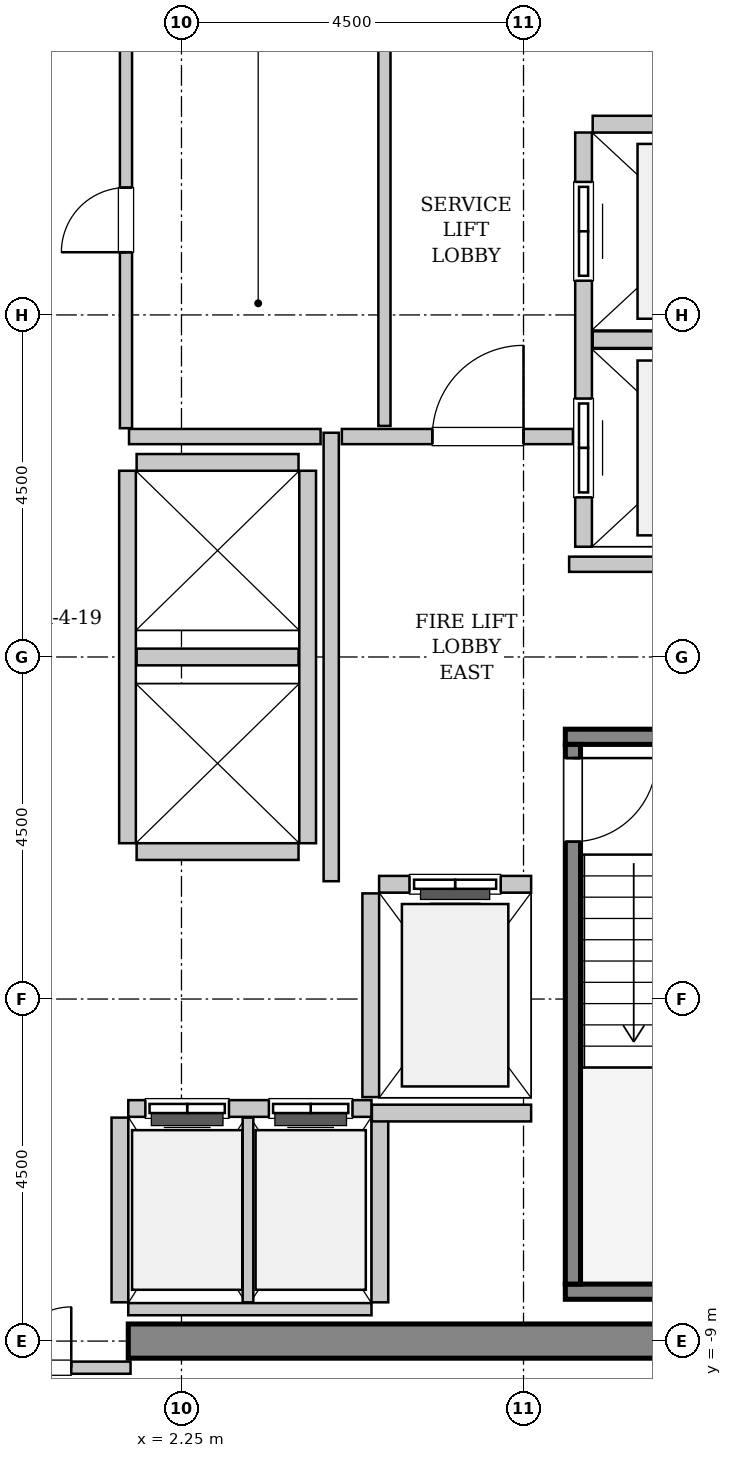
"""IFC4 building model, lengths in metres.
Left out: names, types, materials, properties, quantities, classifications, styles, units other than length and angle.
Written with IfcOpenShell. Run it as: python <this file> out.ifc"""

import sys

from ifc_helpers import new_model, si_unit, direction, frame, frame_2d, origin, place, context, subcontext, project, spatial, rectangle, extrude, source, transform, mapped, element, fill, save


model = new_model("IFC4")
c1 = context("Model", 3, precision=1e-05, world=origin(), true_north=direction((0.0, 1.0)))
c2 = subcontext(c1, "Body", "Model", "MODEL_VIEW")
j1 = project(units=[si_unit("LENGTHUNIT", "METRE"), si_unit("PLANEANGLEUNIT", "RADIAN")], contexts=[c1])
p1 = place(None, origin())
s1 = spatial("IfcSite", under=j1, at=p1, CompositionType="ELEMENT")
p2 = place(p1, origin())
s2 = spatial("IfcBuilding", under=s1, at=p2, CompositionType="ELEMENT")
p3 = place(p2, frame((0.0, 0.0, 225.6)))
s3 = spatial("IfcBuildingStorey", under=s2, at=p3, CompositionType="ELEMENT", Elevation=225.6)
m1 = source(origin(), c2, "Body", "SweptSolid", [
    extrude(rectangle(XDim=9.925, YDim=0.45, at=frame_2d((4.962, 0.0))), origin(), (0.0, 0.0, 1.0), 3.8),
])
p4 = place(p3, frame((1.55, -9.0, 0.0), z_axis=(0.0, 0.0, 1.0), x_axis=(1.0, 0.0, 0.0)))
e1 = element("IfcWall", 1, at=p4, inside=s3, PredefinedType="SHEAR", context=c2, shape_type="MappedRepresentation", body=[
    mapped(m1, transform((0.0, 0.0, 0.0), x_axis=(1.0, 0.0, 0.0), y_axis=(0.0, 1.0, 0.0), z_axis=(0.0, 0.0, 1.0), scale=1.0)),
])
m2 = source(origin(), c2, "Body", "SweptSolid", [
    extrude(rectangle(XDim=3.4, YDim=0.2, at=frame_2d((1.7, 0.0))), origin(), (0.0, 0.0, 1.0), 3.8),
])
p5 = place(p3, frame((7.3, -1.05, 0.0), z_axis=(0.0, 0.0, 1.0), x_axis=(1.0, 0.0, 0.0)))
e2 = element("IfcWall", 2, at=p5, inside=s3, PredefinedType="SOLIDWALL", context=c2, shape_type="MappedRepresentation", body=[
    mapped(m2, transform((0.0, 0.0, 0.0), x_axis=(1.0, 0.0, 0.0), y_axis=(0.0, 1.0, 0.0), z_axis=(0.0, 0.0, 1.0), scale=1.0)),
])
m3 = source(origin(), c2, "Body", "SweptSolid", [
    extrude(rectangle(XDim=3.73, YDim=0.2, at=frame_2d((1.865, 0.0))), origin(), (0.0, 0.0, 1.0), 3.8),
])
p6 = place(p3, frame((7.3, -8.35, 0.0), z_axis=(0.0, 0.0, 1.0), x_axis=(1.0, 0.0, 0.0)))
e3 = element("IfcWall", 3, at=p6, inside=s3, PredefinedType="SOLIDWALL", context=c2, shape_type="MappedRepresentation", body=[
    mapped(m3, transform((0.0, 0.0, 0.0), x_axis=(1.0, 0.0, 0.0), y_axis=(0.0, 1.0, 0.0), z_axis=(0.0, 0.0, 1.0), scale=1.0)),
])
m4 = source(origin(), c2, "Body", "SweptSolid", [
    extrude(rectangle(XDim=7.1, YDim=0.2, at=frame_2d((3.55, 0.0))), origin(), (0.0, 0.0, 1.0), 3.8),
])
p7 = place(p3, frame((7.4, -1.15, 0.0), z_axis=(0.0, 0.0, 1.0), x_axis=(0.0, -1.0, 0.0)))
e4 = element("IfcWall", 4, at=p7, inside=s3, PredefinedType="SOLIDWALL", context=c2, shape_type="MappedRepresentation", body=[
    mapped(m4, transform((0.0, 0.0, 0.0), x_axis=(1.0, 0.0, 0.0), y_axis=(0.0, 1.0, 0.0), z_axis=(0.0, 0.0, 1.0), scale=1.0)),
])
p8 = place(p7, frame((0.18, 0.0, 0.0)))
e5 = element("IfcOpeningElement", 5, at=p8, cuts=e4, PredefinedType="OPENING", context=c2, shape_type="SweptSolid", body=[
    extrude(rectangle(XDim=1.1, YDim=2.15, at=frame_2d((0.55, 1.075))), frame((0.0, 0.11, 0.0), z_axis=(0.0, -1.0, 0.0), x_axis=(1.0, 0.0, 0.0)), (0.0, 0.0, 1.0), 0.22),
])
m5 = source(origin(), c2, "Body", "SweptSolid", [
    extrude(rectangle(XDim=2.0, YDim=0.22, at=frame_2d((1.0, 0.0))), origin(), (0.0, 0.0, 1.0), 3.535),
])
p9 = place(p3, frame((6.85, -2.99, 0.0), z_axis=(0.0, 0.0, 1.0), x_axis=(-1.0, 0.0, 0.0)))
e6 = element("IfcWall", 6, at=p9, inside=s3, PredefinedType="SOLIDWALL", context=c2, shape_type="MappedRepresentation", body=[
    mapped(m5, transform((0.0, 0.0, 0.0), x_axis=(1.0, 0.0, 0.0), y_axis=(0.0, 1.0, 0.0), z_axis=(0.0, 0.0, 1.0), scale=1.0)),
])
p10 = place(p9, frame((0.4, 0.0, 0.0)))
e7 = element("IfcOpeningElement", 7, at=p10, cuts=e6, PredefinedType="OPENING", context=c2, shape_type="SweptSolid", body=[
    extrude(rectangle(XDim=1.2, YDim=2.2, at=frame_2d((0.6, 1.1))), frame((0.0, 0.12, 0.0), z_axis=(0.0, -1.0, 0.0), x_axis=(1.0, 0.0, 0.0)), (0.0, 0.0, 1.0), 0.24),
])
m6 = source(origin(), c2, "Body", "SweptSolid", [
    extrude(rectangle(XDim=2.68, YDim=0.22, at=frame_2d((1.34, 0.0))), origin(), (0.0, 0.0, 1.0), 3.535),
])
p11 = place(p3, frame((4.74, -3.11, 0.0), z_axis=(0.0, 0.0, 1.0), x_axis=(0.0, -1.0, 0.0)))
e8 = element("IfcWall", 8, at=p11, inside=s3, PredefinedType="SOLIDWALL", context=c2, shape_type="MappedRepresentation", body=[
    mapped(m6, transform((0.0, 0.0, 0.0), x_axis=(1.0, 0.0, 0.0), y_axis=(0.0, 1.0, 0.0), z_axis=(0.0, 0.0, 1.0), scale=1.0)),
])
m7 = source(origin(), c2, "Body", "SweptSolid", [
    extrude(rectangle(XDim=5.45, YDim=0.22, at=frame_2d((2.725, 0.0))), origin(), (0.0, 0.0, 1.0), 3.535),
])
p12 = place(p3, frame((7.54, 6.9, 0.0), z_axis=(0.0, 0.0, 1.0), x_axis=(0.0, -1.0, 0.0)))
e9 = element("IfcWall", 9, at=p12, inside=s3, PredefinedType="SOLIDWALL", context=c2, shape_type="MappedRepresentation", body=[
    mapped(m7, transform((0.0, 0.0, 0.0), x_axis=(1.0, 0.0, 0.0), y_axis=(0.0, 1.0, 0.0), z_axis=(0.0, 0.0, 1.0), scale=1.0)),
])
p13 = place(p12, frame((3.5, 0.0, 0.0)))
e10 = element("IfcOpeningElement", 10, at=p13, cuts=e9, PredefinedType="OPENING", context=c2, shape_type="SweptSolid", body=[
    extrude(rectangle(XDim=1.3, YDim=2.3, at=frame_2d((0.65, 1.15))), frame((0.0, 0.12, 0.0), z_axis=(0.0, -1.0, 0.0), x_axis=(1.0, 0.0, 0.0)), (0.0, 0.0, 1.0), 0.24),
])
p14 = place(p12, frame((0.65, 0.0, 0.0)))
e11 = element("IfcOpeningElement", 11, at=p14, cuts=e9, PredefinedType="OPENING", context=c2, shape_type="SweptSolid", body=[
    extrude(rectangle(XDim=1.3, YDim=2.3, at=frame_2d((0.65, 1.15))), frame((0.0, 0.12, 0.0), z_axis=(0.0, -1.0, 0.0), x_axis=(1.0, 0.0, 0.0)), (0.0, 0.0, 1.0), 0.24),
])
m8 = source(origin(), c2, "Body", "SweptSolid", [
    extrude(rectangle(XDim=2.78, YDim=0.22, at=frame_2d((1.39, 0.0))), origin(), (0.0, 0.0, 1.0), 3.535),
])
for number, where, z_axis, x_axis in (
    (12, (7.66, 4.175, 0.0), (0.0, 0.0, 1.0), (1.0, 0.0, 0.0)),
    (13, (10.44, 7.01, 0.0), (0.0, 0.0, 1.0), (-1.0, 0.0, 0.0)),
):
    element("IfcWall", number, at=place(p3, frame(where, z_axis=z_axis, x_axis=x_axis)), inside=s3, PredefinedType="SOLIDWALL", context=c2, shape_type="MappedRepresentation", body=[
        mapped(m8, transform((0.0, 0.0, 0.0), x_axis=(1.0, 0.0, 0.0), y_axis=(0.0, 1.0, 0.0), z_axis=(0.0, 0.0, 1.0), scale=1.0)),
    ])
m9 = source(origin(), c2, "Body", "SweptSolid", [
    extrude(rectangle(XDim=3.2, YDim=0.22, at=frame_2d((1.6, 0.0))), origin(), (0.0, 0.0, 1.0), 3.535),
])
p15 = place(p3, frame((4.75, -5.94, 0.0), z_axis=(0.0, 0.0, 1.0), x_axis=(-1.0, 0.0, 0.0)))
e14 = element("IfcWall", 14, at=p15, inside=s3, PredefinedType="SOLIDWALL", context=c2, shape_type="MappedRepresentation", body=[
    mapped(m9, transform((0.0, 0.0, 0.0), x_axis=(1.0, 0.0, 0.0), y_axis=(0.0, 1.0, 0.0), z_axis=(0.0, 0.0, 1.0), scale=1.0)),
])
p16 = place(p15, frame((1.875, 0.0, 0.0)))
e15 = element("IfcOpeningElement", 15, at=p16, cuts=e14, PredefinedType="OPENING", context=c2, shape_type="SweptSolid", body=[
    extrude(rectangle(XDim=1.1, YDim=2.2, at=frame_2d((0.55, 1.1))), frame((0.0, 0.12, 0.0), z_axis=(0.0, -1.0, 0.0), x_axis=(1.0, 0.0, 0.0)), (0.0, 0.0, 1.0), 0.24),
])
p17 = place(p15, frame((0.25, 0.0, 0.0)))
e16 = element("IfcOpeningElement", 16, at=p17, cuts=e14, PredefinedType="OPENING", context=c2, shape_type="SweptSolid", body=[
    extrude(rectangle(XDim=1.1, YDim=2.2, at=frame_2d((0.55, 1.1))), frame((0.0, 0.12, 0.0), z_axis=(0.0, -1.0, 0.0), x_axis=(1.0, 0.0, 0.0)), (0.0, 0.0, 1.0), 0.24),
])
m10 = source(origin(), c2, "Body", "SweptSolid", [
    extrude(rectangle(XDim=3.2, YDim=0.16, at=frame_2d((1.6, 0.0))), origin(), (0.0, 0.0, 1.0), 2.625),
])
p18 = place(p3, frame((1.55, -8.58, 0.0), z_axis=(0.0, 0.0, 1.0), x_axis=(1.0, 0.0, 0.0)))
e17 = element("IfcWall", 17, at=p18, inside=s3, PredefinedType="PARTITIONING", context=c2, shape_type="MappedRepresentation", body=[
    mapped(m10, transform((0.0, 0.0, 0.0), x_axis=(1.0, 0.0, 0.0), y_axis=(0.0, 1.0, 0.0), z_axis=(0.0, 0.0, 1.0), scale=1.0)),
])
m11 = source(origin(), c2, "Body", "SweptSolid", [
    extrude(rectangle(XDim=2.43, YDim=0.22, at=frame_2d((1.215, 0.0))), origin(), (0.0, 0.0, 1.0), 3.535),
])
p19 = place(p3, frame((1.44, -6.06, 0.0), z_axis=(0.0, 0.0, 1.0), x_axis=(0.0, -1.0, 0.0)))
e18 = element("IfcWall", 18, at=p19, inside=s3, PredefinedType="SOLIDWALL", context=c2, shape_type="MappedRepresentation", body=[
    mapped(m11, transform((0.0, 0.0, 0.0), x_axis=(1.0, 0.0, 0.0), y_axis=(0.0, 1.0, 0.0), z_axis=(0.0, 0.0, 1.0), scale=1.0)),
])
m12 = source(origin(), c2, "Body", "SweptSolid", [
    extrude(rectangle(XDim=2.43, YDim=0.14, at=frame_2d((1.215, 0.0))), origin(), (0.0, 0.0, 1.0), 3.535),
])
p20 = place(p3, frame((3.125, -8.49, 0.0), z_axis=(0.0, 0.0, 1.0), x_axis=(0.0, 1.0, 0.0)))
e19 = element("IfcWall", 19, at=p20, inside=s3, PredefinedType="PARTITIONING", context=c2, shape_type="MappedRepresentation", body=[
    mapped(m12, transform((0.0, 0.0, 0.0), x_axis=(1.0, 0.0, 0.0), y_axis=(0.0, 1.0, 0.0), z_axis=(0.0, 0.0, 1.0), scale=1.0)),
])
p21 = place(p3, frame((4.86, -8.49, 0.0), z_axis=(0.0, 0.0, 1.0), x_axis=(0.0, 1.0, 0.0)))
e20 = element("IfcWall", 20, at=p21, inside=s3, PredefinedType="SOLIDWALL", context=c2, shape_type="MappedRepresentation", body=[
    mapped(m11, transform((0.0, 0.0, 0.0), x_axis=(1.0, 0.0, 0.0), y_axis=(0.0, 1.0, 0.0), z_axis=(0.0, 0.0, 1.0), scale=1.0)),
])
m13 = source(origin(), c2, "Body", "SweptSolid", [
    extrude(rectangle(XDim=4.9, YDim=0.22, at=frame_2d((2.45, 0.0))), origin(), (0.0, 0.0, 1.0), 3.535),
])
for number, where, z_axis, x_axis in (
    (21, (1.54, 2.45, 0.0), (0.0, 0.0, 1.0), (0.0, -1.0, 0.0)),
    (22, (3.91, -2.45, 0.0), (0.0, 0.0, 1.0), (0.0, 1.0, 0.0)),
):
    element("IfcWall", number, at=place(p3, frame(where, z_axis=z_axis, x_axis=x_axis)), inside=s3, PredefinedType="SOLIDWALL", context=c2, shape_type="MappedRepresentation", body=[
        mapped(m13, transform((0.0, 0.0, 0.0), x_axis=(1.0, 0.0, 0.0), y_axis=(0.0, 1.0, 0.0), z_axis=(0.0, 0.0, 1.0), scale=1.0)),
    ])
m14 = source(origin(), c2, "Body", "SweptSolid", [
    extrude(rectangle(XDim=2.13, YDim=0.22, at=frame_2d((1.065, 0.0))), origin(), (0.0, 0.0, 1.0), 3.535),
])
for number, where, z_axis, x_axis in (
    (23, (1.66, -2.56, 0.0), (0.0, 0.0, 1.0), (1.0, 0.0, 0.0)),
    (24, (1.66, 0.0, 0.0), (0.0, 0.0, 1.0), (1.0, 0.0, 0.0)),
    (25, (3.79, 2.56, 0.0), (0.0, 0.0, 1.0), (-1.0, 0.0, 0.0)),
):
    element("IfcWall", number, at=place(p3, frame(where, z_axis=z_axis, x_axis=x_axis)), inside=s3, PredefinedType="SOLIDWALL", context=c2, shape_type="MappedRepresentation", body=[
        mapped(m14, transform((0.0, 0.0, 0.0), x_axis=(1.0, 0.0, 0.0), y_axis=(0.0, 1.0, 0.0), z_axis=(0.0, 0.0, 1.0), scale=1.0)),
    ])
m15 = source(origin(), c2, "Body", "SweptSolid", [
    extrude(rectangle(XDim=2.095, YDim=0.22, at=frame_2d((1.048, 0.0))), origin(), (0.0, 0.0, 1.0), 3.535),
])
p22 = place(p3, frame((4.755, -6.0, 0.0), z_axis=(0.0, 0.0, 1.0), x_axis=(1.0, 0.0, 0.0)))
e26 = element("IfcWall", 26, at=p22, inside=s3, PredefinedType="SOLIDWALL", context=c2, shape_type="MappedRepresentation", body=[
    mapped(m15, transform((0.0, 0.0, 0.0), x_axis=(1.0, 0.0, 0.0), y_axis=(0.0, 1.0, 0.0), z_axis=(0.0, 0.0, 1.0), scale=1.0)),
])
m16 = source(origin(), c2, "Body", "SweptSolid", [
    extrude(rectangle(XDim=5.9, YDim=0.2, at=frame_2d((2.95, 0.0))), origin(), (0.0, 0.0, 1.0), 3.535),
])
p23 = place(p3, frame((4.22, -2.95, 0.0), z_axis=(0.0, 0.0, 1.0), x_axis=(0.0, 1.0, 0.0)))
e27 = element("IfcWall", 27, at=p23, inside=s3, PredefinedType="PARTITIONING", context=c2, shape_type="MappedRepresentation", body=[
    mapped(m16, transform((0.0, 0.0, 0.0), x_axis=(1.0, 0.0, 0.0), y_axis=(0.0, 1.0, 0.0), z_axis=(0.0, 0.0, 1.0), scale=1.0)),
])
m17 = source(origin(), c2, "Body", "SweptSolid", [
    extrude(rectangle(XDim=2.52, YDim=0.2, at=frame_2d((1.26, 0.0))), origin(), (0.0, 0.0, 1.0), 3.535),
])
p24 = place(p3, frame((1.56, 2.9, 0.0), z_axis=(0.0, 0.0, 1.0), x_axis=(1.0, 0.0, 0.0)))
e28 = element("IfcWall", 28, at=p24, inside=s3, PredefinedType="PARTITIONING", context=c2, shape_type="MappedRepresentation", body=[
    mapped(m17, transform((0.0, 0.0, 0.0), x_axis=(1.0, 0.0, 0.0), y_axis=(0.0, 1.0, 0.0), z_axis=(0.0, 0.0, 1.0), scale=1.0)),
])
m18 = source(origin(), c2, "Body", "SweptSolid", [
    extrude(rectangle(XDim=3.04, YDim=0.2, at=frame_2d((1.52, 0.0))), origin(), (0.0, 0.0, 1.0), 3.535),
])
p25 = place(p3, frame((4.36, 2.9, 0.0), z_axis=(0.0, 0.0, 1.0), x_axis=(1.0, 0.0, 0.0)))
e29 = element("IfcWall", 29, at=p25, inside=s3, PredefinedType="PARTITIONING", context=c2, shape_type="MappedRepresentation", body=[
    mapped(m18, transform((0.0, 0.0, 0.0), x_axis=(1.0, 0.0, 0.0), y_axis=(0.0, 1.0, 0.0), z_axis=(0.0, 0.0, 1.0), scale=1.0)),
])
p26 = place(p25, frame((1.19, 0.0, 0.0)))
e30 = element("IfcOpeningElement", 30, at=p26, cuts=e29, PredefinedType="OPENING", context=c2, shape_type="SweptSolid", body=[
    extrude(rectangle(XDim=1.2, YDim=2.15, at=frame_2d((0.6, 1.075))), frame((0.0, 0.11, 0.0), z_axis=(0.0, -1.0, 0.0), x_axis=(1.0, 0.0, 0.0)), (0.0, 0.0, 1.0), 0.22),
])
m19 = source(origin(), c2, "Body", "SweptSolid", [
    extrude(rectangle(XDim=4.11, YDim=0.2, at=frame_2d((2.055, 0.0))), origin(), (0.0, 0.0, 1.0), 3.535),
])
p27 = place(p3, frame((7.35, 1.22, 0.0), z_axis=(0.0, 0.0, 1.0), x_axis=(1.0, 0.0, 0.0)))
e31 = element("IfcWall", 31, at=p27, inside=s3, PredefinedType="PARTITIONING", context=c2, shape_type="MappedRepresentation", body=[
    mapped(m19, transform((0.0, 0.0, 0.0), x_axis=(1.0, 0.0, 0.0), y_axis=(0.0, 1.0, 0.0), z_axis=(0.0, 0.0, 1.0), scale=1.0)),
])
m20 = source(origin(), c2, "Body", "SweptSolid", [
    extrude(rectangle(XDim=3.16, YDim=0.16, at=frame_2d((1.58, 0.0))), origin(), (0.0, 0.0, 1.0), 2.625),
])
p28 = place(p3, frame((-1.58, -9.35, 0.0), z_axis=(0.0, 0.0, 1.0), x_axis=(1.0, 0.0, 0.0)))
e32 = element("IfcWall", 32, at=p28, inside=s3, PredefinedType="PARTITIONING", context=c2, shape_type="MappedRepresentation", body=[
    mapped(m20, transform((0.0, 0.0, 0.0), x_axis=(1.0, 0.0, 0.0), y_axis=(0.0, 1.0, 0.0), z_axis=(0.0, 0.0, 1.0), scale=1.0)),
])
p29 = place(p28, frame((0.78, 0.0, 0.0)))
e33 = element("IfcOpeningElement", 33, at=p29, cuts=e32, PredefinedType="OPENING", context=c2, shape_type="SweptSolid", body=[
    extrude(rectangle(XDim=1.6, YDim=2.3, at=frame_2d((0.8, 1.15))), frame((0.0, 0.09, 0.0), z_axis=(0.0, -1.0, 0.0), x_axis=(1.0, 0.0, 0.0)), (0.0, 0.0, 1.0), 0.18),
])
m21 = source(origin(), c2, "Body", "SweptSolid", [
    extrude(rectangle(XDim=5.45, YDim=0.16, at=frame_2d((2.725, 0.0))), origin(), (0.0, 0.0, 1.0), 3.535),
])
p30 = place(p3, frame((4.92, 3.04, 0.0), z_axis=(0.0, 0.0, 1.0), x_axis=(0.0, 1.0, 0.0)))
e34 = element("IfcWall", 34, at=p30, inside=s3, PredefinedType="PARTITIONING", context=c2, shape_type="MappedRepresentation", body=[
    mapped(m21, transform((0.0, 0.0, 0.0), x_axis=(1.0, 0.0, 0.0), y_axis=(0.0, 1.0, 0.0), z_axis=(0.0, 0.0, 1.0), scale=1.0)),
])
m22 = source(origin(), c2, "Body", "SweptSolid", [
    extrude(rectangle(XDim=5.48, YDim=0.16, at=frame_2d((2.74, 0.0))), origin(), (0.0, 0.0, 1.0), 3.535),
])
p31 = place(p3, frame((1.52, 3.01, 0.0), z_axis=(0.0, 0.0, 1.0), x_axis=(0.0, 1.0, 0.0)))
e35 = element("IfcWall", 35, at=p31, inside=s3, PredefinedType="PARTITIONING", context=c2, shape_type="MappedRepresentation", body=[
    mapped(m22, transform((0.0, 0.0, 0.0), x_axis=(1.0, 0.0, 0.0), y_axis=(0.0, 1.0, 0.0), z_axis=(0.0, 0.0, 1.0), scale=1.0)),
])
p32 = place(p31, frame((2.315, 0.0, 0.0)))
e36 = element("IfcOpeningElement", 36, at=p32, cuts=e35, PredefinedType="OPENING", context=c2, shape_type="SweptSolid", body=[
    extrude(rectangle(XDim=0.85, YDim=2.1, at=frame_2d((0.425, 1.05))), frame((0.0, 0.09, 0.0), z_axis=(0.0, -1.0, 0.0), x_axis=(1.0, 0.0, 0.0)), (0.0, 0.0, 1.0), 0.18),
])
m23 = source(origin(), c2, "Body", "SweptSolid", [
    extrude(rectangle(XDim=1.1, YDim=2.15, at=frame_2d((0.55, 1.075))), frame((0.0, 0.025, 0.0), z_axis=(0.0, -1.0, 0.0), x_axis=(1.0, 0.0, 0.0)), (0.0, 0.0, 1.0), 0.05),
])
p33 = place(p8, origin())
e37 = element("IfcDoor", 37, at=p33, inside=s3, OperationType="SINGLE_SWING_LEFT", PredefinedType="DOOR", context=c2, shape_type="MappedRepresentation", body=[
    mapped(m23, transform((0.0, 0.0, 0.0), x_axis=(1.0, 0.0, 0.0), y_axis=(0.0, 1.0, 0.0), z_axis=(0.0, 0.0, 1.0), scale=1.0)),
])
fill(e5, e37)
m24 = source(origin(), c2, "Body", "SweptSolid", [
    extrude(rectangle(XDim=1.2, YDim=2.2, at=frame_2d((0.6, 1.1))), frame((0.0, 0.025, 0.0), z_axis=(0.0, -1.0, 0.0), x_axis=(1.0, 0.0, 0.0)), (0.0, 0.0, 1.0), 0.05),
])
p34 = place(p10, origin())
e38 = element("IfcDoor", 38, at=p34, inside=s3, OperationType="SLIDING_TO_LEFT", PredefinedType="DOOR", context=c2, shape_type="MappedRepresentation", body=[
    mapped(m24, transform((0.0, 0.0, 0.0), x_axis=(1.0, 0.0, 0.0), y_axis=(0.0, 1.0, 0.0), z_axis=(0.0, 0.0, 1.0), scale=1.0)),
])
fill(e7, e38)
m25 = source(origin(), c2, "Body", "SweptSolid", [
    extrude(rectangle(XDim=1.3, YDim=2.3, at=frame_2d((0.65, 1.15))), frame((0.0, 0.025, 0.0), z_axis=(0.0, -1.0, 0.0), x_axis=(1.0, 0.0, 0.0)), (0.0, 0.0, 1.0), 0.05),
])
p35 = place(p13, origin())
e39 = element("IfcDoor", 39, at=p35, inside=s3, OperationType="SLIDING_TO_RIGHT", PredefinedType="DOOR", context=c2, shape_type="MappedRepresentation", body=[
    mapped(m25, transform((0.0, 0.0, 0.0), x_axis=(1.0, 0.0, 0.0), y_axis=(0.0, 1.0, 0.0), z_axis=(0.0, 0.0, 1.0), scale=1.0)),
])
fill(e10, e39)
p36 = place(p14, origin())
e40 = element("IfcDoor", 40, at=p36, inside=s3, OperationType="SLIDING_TO_RIGHT", PredefinedType="DOOR", context=c2, shape_type="MappedRepresentation", body=[
    mapped(m25, transform((0.0, 0.0, 0.0), x_axis=(1.0, 0.0, 0.0), y_axis=(0.0, 1.0, 0.0), z_axis=(0.0, 0.0, 1.0), scale=1.0)),
])
fill(e11, e40)
m26 = source(origin(), c2, "Body", "SweptSolid", [
    extrude(rectangle(XDim=1.1, YDim=2.2, at=frame_2d((0.55, 1.1))), frame((0.0, 0.025, 0.0), z_axis=(0.0, -1.0, 0.0), x_axis=(1.0, 0.0, 0.0)), (0.0, 0.0, 1.0), 0.05),
])
p37 = place(p16, origin())
e41 = element("IfcDoor", 41, at=p37, inside=s3, OperationType="DOUBLE_DOOR_SLIDING", PredefinedType="DOOR", context=c2, shape_type="MappedRepresentation", body=[
    mapped(m26, transform((0.0, 0.0, 0.0), x_axis=(1.0, 0.0, 0.0), y_axis=(0.0, 1.0, 0.0), z_axis=(0.0, 0.0, 1.0), scale=1.0)),
])
fill(e15, e41)
p38 = place(p17, origin())
e42 = element("IfcDoor", 42, at=p38, inside=s3, OperationType="DOUBLE_DOOR_SLIDING", PredefinedType="DOOR", context=c2, shape_type="MappedRepresentation", body=[
    mapped(m26, transform((0.0, 0.0, 0.0), x_axis=(1.0, 0.0, 0.0), y_axis=(0.0, 1.0, 0.0), z_axis=(0.0, 0.0, 1.0), scale=1.0)),
])
fill(e16, e42)
m27 = source(origin(), c2, "Body", "SweptSolid", [
    extrude(rectangle(XDim=1.2, YDim=2.15, at=frame_2d((0.6, 1.075))), frame((0.0, 0.025, 0.0), z_axis=(0.0, -1.0, 0.0), x_axis=(1.0, 0.0, 0.0)), (0.0, 0.0, 1.0), 0.05),
])
p39 = place(p26, origin())
e43 = element("IfcDoor", 43, at=p39, inside=s3, OperationType="SINGLE_SWING_RIGHT", PredefinedType="DOOR", context=c2, shape_type="MappedRepresentation", body=[
    mapped(m27, transform((0.0, 0.0, 0.0), x_axis=(1.0, 0.0, 0.0), y_axis=(0.0, 1.0, 0.0), z_axis=(0.0, 0.0, 1.0), scale=1.0)),
])
fill(e30, e43)
m28 = source(origin(), c2, "Body", "SweptSolid", [
    extrude(rectangle(XDim=1.6, YDim=2.3, at=frame_2d((0.8, 1.15))), frame((0.0, 0.025, 0.0), z_axis=(0.0, -1.0, 0.0), x_axis=(1.0, 0.0, 0.0)), (0.0, 0.0, 1.0), 0.05),
])
p40 = place(p29, origin())
e44 = element("IfcDoor", 44, at=p40, inside=s3, OperationType="DOUBLE_DOOR_SINGLE_SWING", PredefinedType="DOOR", context=c2, shape_type="MappedRepresentation", body=[
    mapped(m28, transform((0.0, 0.0, 0.0), x_axis=(1.0, 0.0, 0.0), y_axis=(0.0, 1.0, 0.0), z_axis=(0.0, 0.0, 1.0), scale=1.0)),
])
fill(e33, e44)
m29 = source(origin(), c2, "Body", "SweptSolid", [
    extrude(rectangle(XDim=0.85, YDim=2.1, at=frame_2d((0.425, 1.05))), frame((0.0, 0.025, 0.0), z_axis=(0.0, -1.0, 0.0), x_axis=(1.0, 0.0, 0.0)), (0.0, 0.0, 1.0), 0.05),
])
p41 = place(p32, origin())
e45 = element("IfcDoor", 45, at=p41, inside=s3, OperationType="SINGLE_SWING_LEFT", PredefinedType="DOOR", context=c2, shape_type="MappedRepresentation", body=[
    mapped(m29, transform((0.0, 0.0, 0.0), x_axis=(1.0, 0.0, 0.0), y_axis=(0.0, 1.0, 0.0), z_axis=(0.0, 0.0, 1.0), scale=1.0)),
])
fill(e36, e45)
save(model, sys.argv[1])
